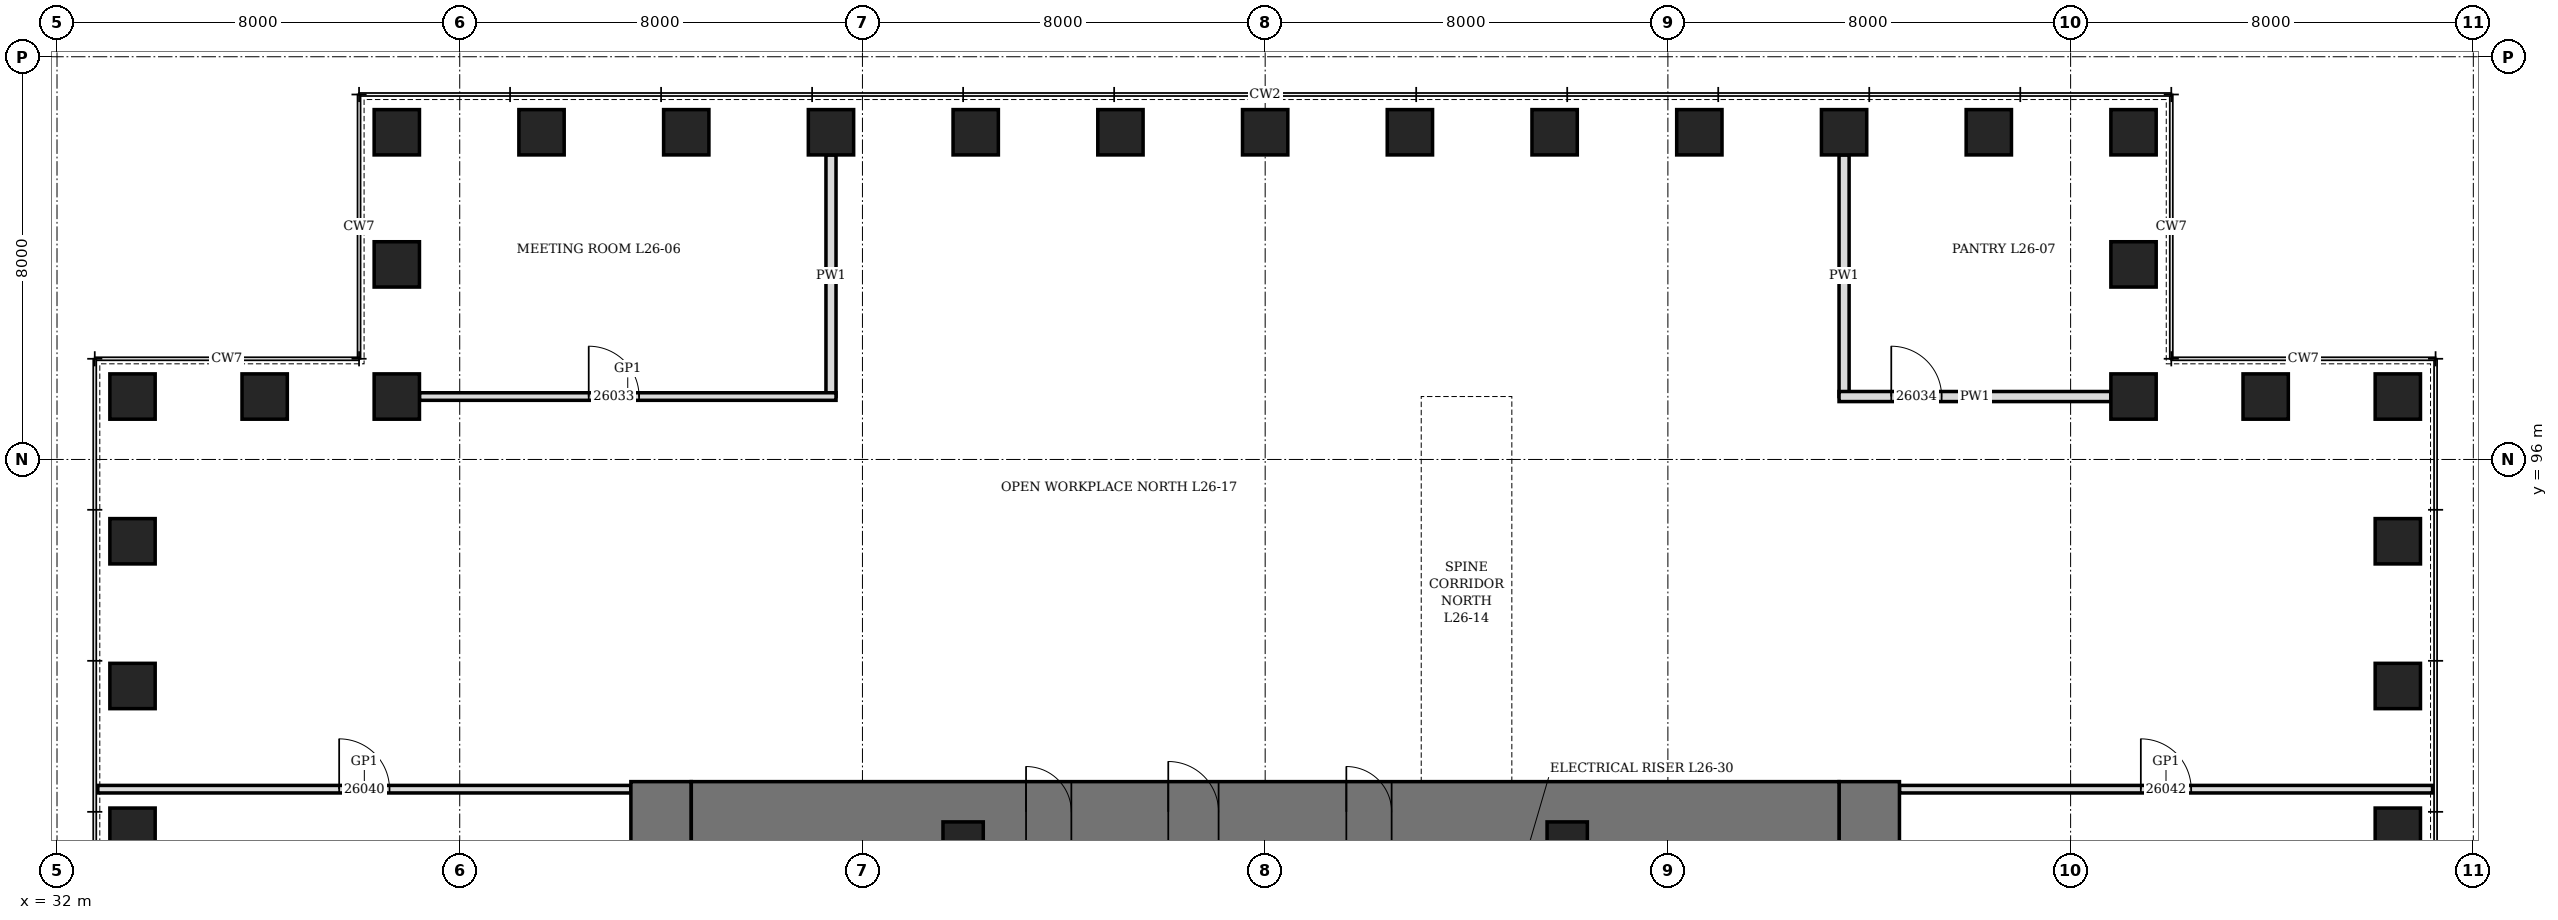
"""IFC4 building model, lengths in metres.
Left out: names, types, materials, properties, quantities, classifications, styles, units other than length and angle.
Written with IfcOpenShell. Run it as: python <this file> out.ifc"""

import sys

from ifc_helpers import new_model, si_unit, direction, frame, frame_2d, origin, origin_2d, place, context, subcontext, project, spatial, rectangle, hollow_rectangle, extrude, element, fill, save


model = new_model("IFC4")
c1 = context("Model", 3, precision=1e-05, world=origin(), true_north=direction((0.0, 1.0)))
c2 = subcontext(c1, "Body", "Model", "MODEL_VIEW")
j1 = project(units=[si_unit("LENGTHUNIT", "METRE"), si_unit("PLANEANGLEUNIT", "RADIAN")], contexts=[c1])
p1 = place(None, origin())
s1 = spatial("IfcSite", under=j1, at=p1, CompositionType="ELEMENT")
p2 = place(p1, origin())
s2 = spatial("IfcBuilding", under=s1, at=p2, CompositionType="ELEMENT")
p3 = place(p2, frame((0.0, 0.0, 120.7)))
s3 = spatial("IfcBuildingStorey", under=s2, at=p3, CompositionType="ELEMENT", Elevation=120.7)
for number, where, z_axis, x_axis in (
    (1, (78.5, 88.625, 0.0), (0.0, 0.0, 1.0), (0.0, 1.0, 0.0)),
    (2, (78.5, 91.5, 0.0), (0.0, 0.0, 1.0), (0.0, 1.0, 0.0)),
    (3, (78.5, 94.375, 0.0), (0.0, 0.0, 1.0), (0.0, 1.0, 0.0)),
    (4, (78.5, 97.25, 0.0), (0.0, 0.0, 1.0), (1.0, 0.0, 0.0)),
    (5, (75.875, 97.25, 0.0), (0.0, 0.0, 1.0), (1.0, 0.0, 0.0)),
    (6, (73.25, 97.25, 0.0), (0.0, 0.0, 1.0), (0.0, 1.0, 0.0)),
    (7, (73.25, 99.875, 0.0), (0.0, 0.0, 1.0), (0.0, 1.0, 0.0)),
    (8, (73.25, 102.5, 0.0), (0.0, 0.0, 1.0), (1.0, 0.0, 0.0)),
    (9, (70.375, 102.5, 0.0), (0.0, 0.0, 1.0), (1.0, 0.0, 0.0)),
    (10, (67.5, 102.5, 0.0), (0.0, 0.0, 1.0), (1.0, 0.0, 0.0)),
    (11, (64.625, 102.5, 0.0), (0.0, 0.0, 1.0), (1.0, 0.0, 0.0)),
    (12, (61.75, 102.5, 0.0), (0.0, 0.0, 1.0), (1.0, 0.0, 0.0)),
    (13, (58.875, 102.5, 0.0), (0.0, 0.0, 1.0), (1.0, 0.0, 0.0)),
    (14, (56.0, 102.5, 0.0), (0.0, 0.0, 1.0), (1.0, 0.0, 0.0)),
    (15, (53.125, 102.5, 0.0), (0.0, 0.0, 1.0), (1.0, 0.0, 0.0)),
    (16, (50.25, 102.5, 0.0), (0.0, 0.0, 1.0), (1.0, 0.0, 0.0)),
    (17, (47.375, 102.5, 0.0), (0.0, 0.0, 1.0), (1.0, 0.0, 0.0)),
    (18, (44.5, 102.5, 0.0), (0.0, 0.0, 1.0), (1.0, 0.0, 0.0)),
    (19, (41.625, 102.5, 0.0), (0.0, 0.0, 1.0), (1.0, 0.0, 0.0)),
    (20, (38.75, 102.5, 0.0), (0.0, 0.0, 1.0), (0.0, 1.0, 0.0)),
    (21, (38.75, 99.875, 0.0), (0.0, 0.0, 1.0), (0.0, 1.0, 0.0)),
    (22, (38.75, 97.25, 0.0), (0.0, 0.0, 1.0), (1.0, 0.0, 0.0)),
    (23, (36.125, 97.25, 0.0), (0.0, 0.0, 1.0), (1.0, 0.0, 0.0)),
    (24, (33.5, 97.25, 0.0), (0.0, 0.0, 1.0), (0.0, 1.0, 0.0)),
    (25, (33.5, 94.375, 0.0), (0.0, 0.0, 1.0), (0.0, 1.0, 0.0)),
    (26, (33.5, 91.5, 0.0), (0.0, 0.0, 1.0), (0.0, 1.0, 0.0)),
    (27, (33.5, 88.625, 0.0), (0.0, 0.0, 1.0), (0.0, 1.0, 0.0)),
):
    element("IfcColumn", number, at=place(p3, frame(where, z_axis=z_axis, x_axis=x_axis)), inside=s3, PredefinedType="COLUMN", context=c2, shape_type="SweptSolid", body=[
        extrude(hollow_rectangle(XDim=0.9, YDim=0.9, WallThickness=0.15, at=origin_2d()), origin(), (0.0, 0.0, 1.0), 4.2),
    ])
p4 = place(p3, frame((44.0, 70.4, 0.0), z_axis=(0.0, 0.0, 1.0), x_axis=(0.0, 1.0, 0.0)))
e28 = element("IfcWall", 28, at=p4, inside=s3, PredefinedType="SHEAR", context=c2, shape_type="SweptSolid", body=[
    extrude(rectangle(XDim=19.2, YDim=1.2, at=frame_2d((9.6, 0.0))), origin(), (0.0, 0.0, 1.0), 4.2),
])
p5 = place(p4, frame((8.6, 0.0, 0.0)))
e29 = element("IfcOpeningElement", 29, at=p5, cuts=e28, PredefinedType="OPENING", context=c2, shape_type="SweptSolid", body=[
    extrude(rectangle(XDim=2.0, YDim=2.4, at=frame_2d((1.0, 1.2))), frame((0.0, 0.61, 0.0), z_axis=(0.0, -1.0, 0.0), x_axis=(1.0, 0.0, 0.0)), (0.0, 0.0, 1.0), 1.22),
])
p6 = place(p3, frame((68.0, 70.4, 0.0), z_axis=(0.0, 0.0, 1.0), x_axis=(0.0, 1.0, 0.0)))
e30 = element("IfcWall", 30, at=p6, inside=s3, PredefinedType="SHEAR", context=c2, shape_type="SweptSolid", body=[
    extrude(rectangle(XDim=19.2, YDim=1.2, at=frame_2d((9.6, 0.0))), origin(), (0.0, 0.0, 1.0), 4.2),
])
p7 = place(p6, frame((8.6, 0.0, 0.0)))
e31 = element("IfcOpeningElement", 31, at=p7, cuts=e30, PredefinedType="OPENING", context=c2, shape_type="SweptSolid", body=[
    extrude(rectangle(XDim=2.0, YDim=2.4, at=frame_2d((1.0, 1.2))), frame((0.0, 0.61, 0.0), z_axis=(0.0, -1.0, 0.0), x_axis=(1.0, 0.0, 0.0)), (0.0, 0.0, 1.0), 1.22),
])
p8 = place(p3, frame((44.6, 89.0, 0.0), z_axis=(0.0, 0.0, 1.0), x_axis=(1.0, 0.0, 0.0)))
e32 = element("IfcWall", 32, at=p8, inside=s3, PredefinedType="SHEAR", context=c2, shape_type="SweptSolid", body=[
    extrude(rectangle(XDim=22.8, YDim=1.2, at=frame_2d((11.4, 0.0))), origin(), (0.0, 0.0, 1.0), 4.2),
])
p9 = place(p8, frame((9.475, 0.0, 0.0)))
e33 = element("IfcOpeningElement", 33, at=p9, cuts=e32, PredefinedType="OPENING", context=c2, shape_type="SweptSolid", body=[
    extrude(rectangle(XDim=1.0, YDim=2.1, at=frame_2d((0.5, 1.05))), frame((0.0, 0.61, 0.0), z_axis=(0.0, -1.0, 0.0), x_axis=(1.0, 0.0, 0.0)), (0.0, 0.0, 1.0), 1.22),
])
p10 = place(p8, frame((6.65, 0.0, 0.0)))
e34 = element("IfcOpeningElement", 34, at=p10, cuts=e32, PredefinedType="OPENING", context=c2, shape_type="SweptSolid", body=[
    extrude(rectangle(XDim=0.9, YDim=2.1, at=frame_2d((0.45, 1.05))), frame((0.0, 0.61, 0.0), z_axis=(0.0, -1.0, 0.0), x_axis=(1.0, 0.0, 0.0)), (0.0, 0.0, 1.0), 1.22),
])
p11 = place(p8, frame((13.012, 0.0, 0.0)))
e35 = element("IfcOpeningElement", 35, at=p11, cuts=e32, PredefinedType="OPENING", context=c2, shape_type="SweptSolid", body=[
    extrude(rectangle(XDim=0.9, YDim=2.1, at=frame_2d((0.45, 1.05))), frame((0.0, 0.61, 0.0), z_axis=(0.0, -1.0, 0.0), x_axis=(1.0, 0.0, 0.0)), (0.0, 0.0, 1.0), 1.22),
])
for number, where, z_axis, x_axis in (
    (36, (50.0, 88.4, 0.0), (0.0, 0.0, 1.0), (1.0, 0.0, 0.0)),
    (37, (62.0, 88.4, 0.0), (0.0, 0.0, 1.0), (1.0, 0.0, 0.0)),
):
    element("IfcColumn", number, at=place(p3, frame(where, z_axis=z_axis, x_axis=x_axis)), inside=s3, PredefinedType="COLUMN", context=c2, shape_type="SweptSolid", body=[
        extrude(hollow_rectangle(XDim=0.8, YDim=0.8, WallThickness=0.1, at=origin_2d()), origin(), (0.0, 0.0, 1.0), 4.2),
    ])
p12 = place(p3, frame((47.375, 97.25, 0.0), z_axis=(0.0, 0.0, 1.0), x_axis=(0.0, 1.0, 0.0)))
e38 = element("IfcWall", 38, at=p12, inside=s3, PredefinedType="PARTITIONING", context=c2, shape_type="SweptSolid", body=[
    extrude(rectangle(XDim=4.8, YDim=0.2, at=frame_2d((2.4, 0.0))), origin(), (0.0, 0.0, 1.0), 3.278),
])
p13 = place(p3, frame((67.5, 97.25, 0.0), z_axis=(0.0, 0.0, 1.0), x_axis=(0.0, 1.0, 0.0)))
e39 = element("IfcWall", 39, at=p13, inside=s3, PredefinedType="PARTITIONING", context=c2, shape_type="SweptSolid", body=[
    extrude(rectangle(XDim=4.8, YDim=0.2, at=frame_2d((2.4, 0.0))), origin(), (0.0, 0.0, 1.0), 2.74),
])
p14 = place(p3, frame((32.81, 89.45, 0.0), z_axis=(0.0, 0.0, 1.0), x_axis=(1.0, 0.0, 0.0)))
e40 = element("IfcWall", 40, at=p14, inside=s3, PredefinedType="PARTITIONING", context=c2, shape_type="SweptSolid", body=[
    extrude(rectangle(XDim=10.59, YDim=0.15, at=frame_2d((5.295, 0.0))), origin(), (0.0, 0.0, 1.0), 4.04),
])
p15 = place(p14, frame((4.795, 0.0, 0.0)))
e41 = element("IfcOpeningElement", 41, at=p15, cuts=e40, PredefinedType="OPENING", context=c2, shape_type="SweptSolid", body=[
    extrude(rectangle(XDim=1.0, YDim=2.4, at=frame_2d((0.5, 1.2))), frame((0.0, 0.085, 0.0), z_axis=(0.0, -1.0, 0.0), x_axis=(1.0, 0.0, 0.0)), (0.0, 0.0, 1.0), 0.17),
])
p16 = place(p3, frame((68.6, 89.45, 0.0), z_axis=(0.0, 0.0, 1.0), x_axis=(1.0, 0.0, 0.0)))
e42 = element("IfcWall", 42, at=p16, inside=s3, PredefinedType="PARTITIONING", context=c2, shape_type="SweptSolid", body=[
    extrude(rectangle(XDim=10.59, YDim=0.15, at=frame_2d((5.295, 0.0))), origin(), (0.0, 0.0, 1.0), 4.04),
])
p17 = place(p16, frame((4.795, 0.0, 0.0)))
e43 = element("IfcOpeningElement", 43, at=p17, cuts=e42, PredefinedType="OPENING", context=c2, shape_type="SweptSolid", body=[
    extrude(rectangle(XDim=1.0, YDim=2.4, at=frame_2d((0.5, 1.2))), frame((0.0, 0.085, 0.0), z_axis=(0.0, -1.0, 0.0), x_axis=(1.0, 0.0, 0.0)), (0.0, 0.0, 1.0), 0.17),
])
p18 = place(p3, frame((39.2, 97.25, 0.0), z_axis=(0.0, 0.0, 1.0), x_axis=(1.0, 0.0, 0.0)))
e44 = element("IfcWall", 44, at=p18, inside=s3, PredefinedType="PARTITIONING", context=c2, shape_type="SweptSolid", body=[
    extrude(rectangle(XDim=8.275, YDim=0.15, at=frame_2d((4.138, 0.0))), origin(), (0.0, 0.0, 1.0), 4.04),
])
p19 = place(p18, frame((3.363, 0.0, 0.0)))
e45 = element("IfcOpeningElement", 45, at=p19, cuts=e44, PredefinedType="OPENING", context=c2, shape_type="SweptSolid", body=[
    extrude(rectangle(XDim=1.0, YDim=2.4, at=frame_2d((0.5, 1.2))), frame((0.0, 0.085, 0.0), z_axis=(0.0, -1.0, 0.0), x_axis=(1.0, 0.0, 0.0)), (0.0, 0.0, 1.0), 0.17),
])
p20 = place(p3, frame((67.4, 97.25, 0.0), z_axis=(0.0, 0.0, 1.0), x_axis=(1.0, 0.0, 0.0)))
e46 = element("IfcWall", 46, at=p20, inside=s3, PredefinedType="PARTITIONING", context=c2, shape_type="SweptSolid", body=[
    extrude(rectangle(XDim=5.4, YDim=0.2, at=frame_2d((2.7, 0.0))), origin(), (0.0, 0.0, 1.0), 4.04),
])
p21 = place(p20, frame((1.038, 0.0, 0.0)))
e47 = element("IfcOpeningElement", 47, at=p21, cuts=e46, PredefinedType="OPENING", context=c2, shape_type="SweptSolid", body=[
    extrude(rectangle(XDim=1.0, YDim=2.1, at=frame_2d((0.5, 1.05))), frame((0.0, 0.11, 0.0), z_axis=(0.0, -1.0, 0.0), x_axis=(1.0, 0.0, 0.0)), (0.0, 0.0, 1.0), 0.22),
])
p22 = place(p9, origin())
e48 = element("IfcDoor", 48, at=p22, inside=s3, OperationType="SINGLE_SWING_LEFT", PredefinedType="DOOR", context=c2, shape_type="SweptSolid", body=[
    extrude(rectangle(XDim=1.0, YDim=2.1, at=frame_2d((0.5, 1.05))), frame((0.0, 0.35, 0.0), z_axis=(0.0, -1.0, 0.0), x_axis=(1.0, 0.0, 0.0)), (0.0, 0.0, 1.0), 0.7),
])
fill(e33, e48)
p23 = place(p10, origin())
e49 = element("IfcDoor", 49, at=p23, inside=s3, OperationType="SINGLE_SWING_LEFT", PredefinedType="DOOR", context=c2, shape_type="SweptSolid", body=[
    extrude(rectangle(XDim=0.9, YDim=2.1, at=frame_2d((0.45, 1.05))), frame((0.0, 0.35, 0.0), z_axis=(0.0, -1.0, 0.0), x_axis=(1.0, 0.0, 0.0)), (0.0, 0.0, 1.0), 0.7),
])
fill(e34, e49)
p24 = place(p11, origin())
e50 = element("IfcDoor", 50, at=p24, inside=s3, OperationType="SINGLE_SWING_LEFT", PredefinedType="DOOR", context=c2, shape_type="SweptSolid", body=[
    extrude(rectangle(XDim=0.9, YDim=2.1, at=frame_2d((0.45, 1.05))), frame((0.0, 0.35, 0.0), z_axis=(0.0, -1.0, 0.0), x_axis=(1.0, 0.0, 0.0)), (0.0, 0.0, 1.0), 0.7),
])
fill(e35, e50)
p25 = place(p19, origin())
e51 = element("IfcDoor", 51, at=p25, inside=s3, OperationType="SINGLE_SWING_RIGHT", PredefinedType="DOOR", context=c2, shape_type="SweptSolid", body=[
    extrude(rectangle(XDim=1.0, YDim=2.4, at=frame_2d((0.5, 1.2))), frame((0.0, 0.075, 0.0), z_axis=(0.0, -1.0, 0.0), x_axis=(1.0, 0.0, 0.0)), (0.0, 0.0, 1.0), 0.149),
])
fill(e45, e51)
p26 = place(p21, origin())
e52 = element("IfcDoor", 52, at=p26, inside=s3, OperationType="SINGLE_SWING_LEFT", PredefinedType="DOOR", context=c2, shape_type="SweptSolid", body=[
    extrude(rectangle(XDim=1.0, YDim=2.1, at=frame_2d((0.5, 1.05))), frame((0.0, 0.1, 0.0), z_axis=(0.0, -1.0, 0.0), x_axis=(1.0, 0.0, 0.0)), (0.0, 0.0, 1.0), 0.199),
])
fill(e47, e52)
p27 = place(p15, origin())
e53 = element("IfcDoor", 53, at=p27, inside=s3, OperationType="SINGLE_SWING_RIGHT", PredefinedType="DOOR", context=c2, shape_type="SweptSolid", body=[
    extrude(rectangle(XDim=1.0, YDim=2.4, at=frame_2d((0.5, 1.2))), frame((0.0, 0.075, 0.0), z_axis=(0.0, -1.0, 0.0), x_axis=(1.0, 0.0, 0.0)), (0.0, 0.0, 1.0), 0.149),
])
fill(e41, e53)
p28 = place(p17, origin())
e54 = element("IfcDoor", 54, at=p28, inside=s3, OperationType="SINGLE_SWING_RIGHT", PredefinedType="DOOR", context=c2, shape_type="SweptSolid", body=[
    extrude(rectangle(XDim=1.0, YDim=2.4, at=frame_2d((0.5, 1.2))), frame((0.0, 0.075, 0.0), z_axis=(0.0, -1.0, 0.0), x_axis=(1.0, 0.0, 0.0)), (0.0, 0.0, 1.0), 0.149),
])
fill(e43, e54)
save(model, sys.argv[1])
